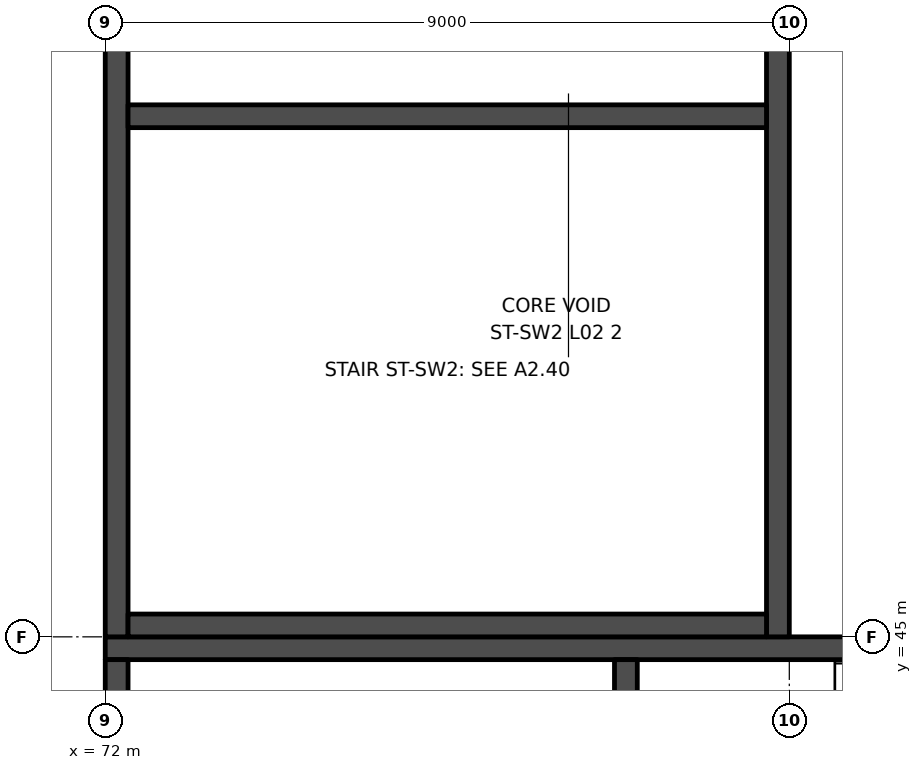
"""IFC4 building model, lengths in metres.
Left out: names, types, materials, properties, quantities, classifications, styles, units other than length and angle.
Written with IfcOpenShell. Run it as: python <this file> out.ifc"""

import sys

from ifc_helpers import new_model, si_unit, direction, frame, frame_2d, origin, place, context, subcontext, project, spatial, rectangle, extrude, element, save


model = new_model("IFC4")
c1 = context("Model", 3, precision=1e-05, world=origin(), true_north=direction((0.0, 1.0)))
c2 = subcontext(c1, "Body", "Model", "MODEL_VIEW")
j1 = project(units=[si_unit("LENGTHUNIT", "METRE"), si_unit("PLANEANGLEUNIT", "RADIAN")], contexts=[c1])
p1 = place(None, origin())
s1 = spatial("IfcSite", under=j1, at=p1, CompositionType="ELEMENT")
p2 = place(p1, origin())
s2 = spatial("IfcBuilding", under=s1, at=p2, CompositionType="ELEMENT")
p3 = place(p2, frame((0.0, 0.0, 11.5)))
s3 = spatial("IfcBuildingStorey", under=s2, at=p3, CompositionType="ELEMENT", Elevation=11.5)
p4 = place(p3, frame((90.25, 44.85, 0.0), z_axis=(0.0, 0.0, 1.0), x_axis=(-1.0, 0.0, 0.0)))
e1 = element("IfcWall", 1, at=p4, inside=s3, PredefinedType="SHEAR", context=c2, shape_type="SweptSolid", body=[
    extrude(rectangle(XDim=18.25, YDim=0.3, at=frame_2d((9.125, 0.0))), origin(), (0.0, 0.0, 1.0), 10.5),
])
p5 = place(p4, frame((1.75, 0.0, 0.0)))
e2 = element("IfcOpeningElement", 2, at=p5, cuts=e1, PredefinedType="OPENING", context=c2, shape_type="SweptSolid", body=[
    extrude(rectangle(XDim=1.2, YDim=2.1, at=frame_2d((0.6, 1.05))), frame((0.0, 0.16, 0.0), z_axis=(0.0, -1.0, 0.0), x_axis=(1.0, 0.0, 0.0)), (0.0, 0.0, 1.0), 0.32),
])
for number, where, z_axis, x_axis in (
    (3, (72.15, 44.7, 0.0), (0.0, 0.0, 1.0), (0.0, -1.0, 0.0)),
    (4, (78.85, 44.7, 0.0), (0.0, 0.0, 1.0), (0.0, -1.0, 0.0)),
):
    element("IfcWall", number, at=place(p3, frame(where, z_axis=z_axis, x_axis=x_axis)), inside=s3, PredefinedType="SHEAR", context=c2, shape_type="SweptSolid", body=[
        extrude(rectangle(XDim=8.4, YDim=0.3, at=frame_2d((4.2, 0.0))), origin(), (0.0, 0.0, 1.0), 10.5),
    ])
p6 = place(p3, frame((80.85, 63.0, 0.0), z_axis=(0.0, 0.0, 1.0), x_axis=(0.0, -1.0, 0.0)))
e5 = element("IfcWall", 5, at=p6, inside=s3, PredefinedType="SHEAR", context=c2, shape_type="SweptSolid", body=[
    extrude(rectangle(XDim=18.0, YDim=0.3, at=frame_2d((9.0, 0.0))), origin(), (0.0, 0.0, 1.0), 10.5),
])
p7 = place(p6, frame((1.5, 0.0, 0.0)))
e6 = element("IfcOpeningElement", 6, at=p7, cuts=e5, PredefinedType="OPENING", context=c2, shape_type="SweptSolid", body=[
    extrude(rectangle(XDim=1.2, YDim=2.1, at=frame_2d((0.6, 1.05))), frame((0.0, 0.16, 0.0), z_axis=(0.0, -1.0, 0.0), x_axis=(1.0, 0.0, 0.0)), (0.0, 0.0, 1.0), 0.32),
])
p8 = place(p3, frame((72.15, 63.0, 0.0), z_axis=(0.0, 0.0, 1.0), x_axis=(0.0, -1.0, 0.0)))
e7 = element("IfcWall", 7, at=p8, inside=s3, PredefinedType="SHEAR", context=c2, shape_type="SweptSolid", body=[
    extrude(rectangle(XDim=18.0, YDim=0.3, at=frame_2d((9.0, 0.0))), origin(), (0.0, 0.0, 1.0), 10.5),
])
for number, where, z_axis, x_axis in (
    (8, (80.7, 45.15, 0.0), (0.0, 0.0, 1.0), (-1.0, 0.0, 0.0)),
    (9, (80.7, 51.85, 0.0), (0.0, 0.0, 1.0), (-1.0, 0.0, 0.0)),
):
    element("IfcWall", number, at=place(p3, frame(where, z_axis=z_axis, x_axis=x_axis)), inside=s3, PredefinedType="SHEAR", context=c2, shape_type="SweptSolid", body=[
        extrude(rectangle(XDim=8.4, YDim=0.3, at=frame_2d((4.2, 0.0))), origin(), (0.0, 0.0, 1.0), 10.5),
    ])
save(model, sys.argv[1])
